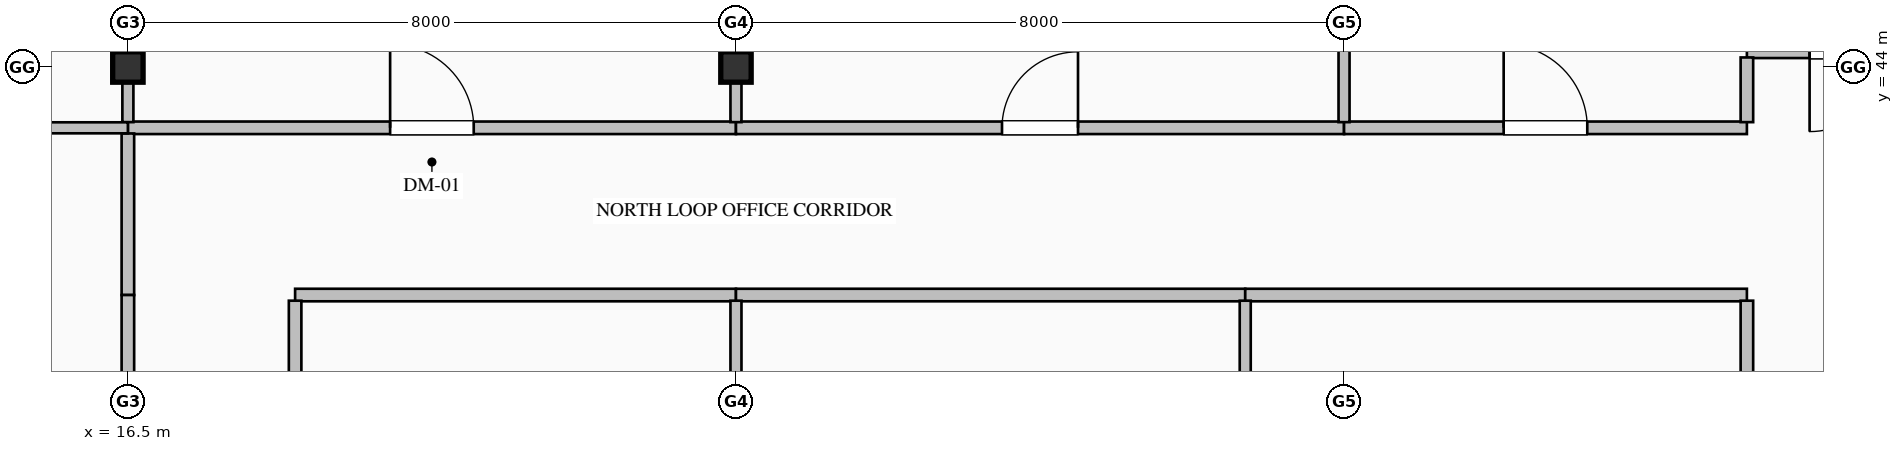
"""IFC4 building model, lengths in metres.
Left out: names, types, materials, properties, quantities, classifications, styles, units other than length and angle.
Written with IfcOpenShell. Run it as: python <this file> out.ifc"""

import sys

from ifc_helpers import new_model, si_unit, direction, frame, frame_2d, origin, origin_2d, place, context, subcontext, project, spatial, rectangle, i_section, extrude, element, fill, save


model = new_model("IFC4")
c1 = context("Model", 3, precision=1e-05, world=origin(), true_north=direction((0.0, 1.0)))
c2 = subcontext(c1, "Body", "Model", "MODEL_VIEW")
j1 = project(units=[si_unit("LENGTHUNIT", "METRE"), si_unit("PLANEANGLEUNIT", "RADIAN")], contexts=[c1])
p1 = place(None, origin())
s1 = spatial("IfcSite", under=j1, at=p1, CompositionType="ELEMENT")
p2 = place(p1, origin())
s2 = spatial("IfcBuilding", under=s1, at=p2, CompositionType="ELEMENT")
p3 = place(p2, frame((0.0, 0.0, 135.0)))
s3 = spatial("IfcBuildingStorey", under=s2, at=p3, CompositionType="ELEMENT", Elevation=135.0)
for number, where, z_axis, x_axis in (
    (1, (16.5, 44.0, 0.0), (0.0, 0.0, 1.0), (1.0, 0.0, 0.0)),
    (2, (24.5, 44.0, 0.0), (0.0, 0.0, 1.0), (1.0, 0.0, 0.0)),
):
    element("IfcColumn", number, at=place(p3, frame(where, z_axis=z_axis, x_axis=x_axis)), inside=s3, PredefinedType="COLUMN", context=c2, shape_type="SweptSolid", body=[
        extrude(i_section(OverallWidth=0.4, OverallDepth=0.4, WebThickness=0.013, FlangeThickness=0.021, FilletRadius=0.022, at=origin_2d()), origin(), (0.0, 0.0, 1.0), 4.0),
    ])
p4 = place(p3, frame((40.5, 44.2, 0.0), z_axis=(0.0, 0.0, 1.0), x_axis=(-1.0, 0.0, 0.0)))
e3 = element("IfcWall", 3, at=p4, inside=s3, PredefinedType="PARTITIONING", context=c2, shape_type="SweptSolid", body=[
    extrude(rectangle(XDim=2.7, YDim=0.165, at=frame_2d((1.35, 0.0))), origin(), (0.0, 0.0, 1.0), 3.765),
])
p5 = place(p4, frame((0.825, 0.0, 0.0)))
e4 = element("IfcOpeningElement", 4, at=p5, cuts=e3, PredefinedType="OPENING", context=c2, shape_type="SweptSolid", body=[
    extrude(rectangle(XDim=1.05, YDim=2.15, at=frame_2d((0.525, 1.075))), frame((0.0, 0.093, 0.0), z_axis=(0.0, -1.0, 0.0), x_axis=(1.0, 0.0, 0.0)), (0.0, 0.0, 1.0), 0.185),
])
p6 = place(p3, frame((16.5, 43.2, 0.0), z_axis=(0.0, 0.0, 1.0), x_axis=(1.0, 0.0, 0.0)))
e5 = element("IfcWall", 5, at=p6, inside=s3, PredefinedType="PARTITIONING", context=c2, shape_type="SweptSolid", body=[
    extrude(rectangle(XDim=8.0, YDim=0.165, at=frame_2d((4.0, 0.0))), origin(), (0.0, 0.0, 1.0), 3.765),
])
p7 = place(p6, frame((3.45, 0.0, 0.0)))
e6 = element("IfcOpeningElement", 6, at=p7, cuts=e5, PredefinedType="OPENING", context=c2, shape_type="SweptSolid", body=[
    extrude(rectangle(XDim=1.1, YDim=2.2, at=frame_2d((0.55, 1.1))), frame((0.0, 0.093, 0.0), z_axis=(0.0, -1.0, 0.0), x_axis=(1.0, 0.0, 0.0)), (0.0, 0.0, 1.0), 0.185),
])
p8 = place(p3, frame((24.5, 43.2, 0.0), z_axis=(0.0, 0.0, 1.0), x_axis=(1.0, 0.0, 0.0)))
e7 = element("IfcWall", 7, at=p8, inside=s3, PredefinedType="PARTITIONING", context=c2, shape_type="SweptSolid", body=[
    extrude(rectangle(XDim=8.0, YDim=0.165, at=frame_2d((4.0, 0.0))), origin(), (0.0, 0.0, 1.0), 3.765),
])
p9 = place(p8, frame((3.5, 0.0, 0.0)))
e8 = element("IfcOpeningElement", 8, at=p9, cuts=e7, PredefinedType="OPENING", context=c2, shape_type="SweptSolid", body=[
    extrude(rectangle(XDim=1.0, YDim=2.15, at=frame_2d((0.5, 1.075))), frame((0.0, 0.093, 0.0), z_axis=(0.0, -1.0, 0.0), x_axis=(1.0, 0.0, 0.0)), (0.0, 0.0, 1.0), 0.185),
])
p10 = place(p3, frame((32.5, 43.2, 0.0), z_axis=(0.0, 0.0, 1.0), x_axis=(1.0, 0.0, 0.0)))
e9 = element("IfcWall", 9, at=p10, inside=s3, PredefinedType="PARTITIONING", context=c2, shape_type="SweptSolid", body=[
    extrude(rectangle(XDim=5.3, YDim=0.165, at=frame_2d((2.65, 0.0))), origin(), (0.0, 0.0, 1.0), 3.765),
])
p11 = place(p10, frame((2.1, 0.0, 0.0)))
e10 = element("IfcOpeningElement", 10, at=p11, cuts=e9, PredefinedType="OPENING", context=c2, shape_type="SweptSolid", body=[
    extrude(rectangle(XDim=1.1, YDim=2.2, at=frame_2d((0.55, 1.1))), frame((0.0, 0.093, 0.0), z_axis=(0.0, -1.0, 0.0), x_axis=(1.0, 0.0, 0.0)), (0.0, 0.0, 1.0), 0.185),
])
p12 = place(p3, frame((24.5, 41.0, 0.0), z_axis=(0.0, 0.0, 1.0), x_axis=(-1.0, 0.0, 0.0)))
e11 = element("IfcWall", 11, at=p12, inside=s3, PredefinedType="PARTITIONING", context=c2, shape_type="SweptSolid", body=[
    extrude(rectangle(XDim=5.8, YDim=0.165, at=frame_2d((2.9, 0.0))), origin(), (0.0, 0.0, 1.0), 3.765),
])
p13 = place(p3, frame((31.2, 41.0, 0.0), z_axis=(0.0, 0.0, 1.0), x_axis=(-1.0, 0.0, 0.0)))
e12 = element("IfcWall", 12, at=p13, inside=s3, PredefinedType="PARTITIONING", context=c2, shape_type="SweptSolid", body=[
    extrude(rectangle(XDim=6.7, YDim=0.165, at=frame_2d((3.35, 0.0))), origin(), (0.0, 0.0, 1.0), 3.765),
])
p14 = place(p3, frame((37.8, 41.0, 0.0), z_axis=(0.0, 0.0, 1.0), x_axis=(-1.0, 0.0, 0.0)))
e13 = element("IfcWall", 13, at=p14, inside=s3, PredefinedType="PARTITIONING", context=c2, shape_type="SweptSolid", body=[
    extrude(rectangle(XDim=6.6, YDim=0.165, at=frame_2d((3.3, 0.0))), origin(), (0.0, 0.0, 1.0), 3.765),
])
p15 = place(p3, frame((16.5, 41.0, 0.0), z_axis=(0.0, 0.0, 1.0), x_axis=(0.0, 1.0, 0.0)))
e14 = element("IfcWall", 14, at=p15, inside=s3, PredefinedType="PARTITIONING", context=c2, shape_type="SweptSolid", body=[
    extrude(rectangle(XDim=2.125, YDim=0.165, at=frame_2d((1.063, 0.0))), origin(), (0.0, 0.0, 1.0), 3.157),
])
p16 = place(p3, frame((18.7, 40.926, 0.0), z_axis=(0.0, 0.0, 1.0), x_axis=(0.0, -1.0, 0.0)))
e15 = element("IfcWall", 15, at=p16, inside=s3, PredefinedType="PARTITIONING", context=c2, shape_type="SweptSolid", body=[
    extrude(rectangle(XDim=7.451, YDim=0.165, at=frame_2d((3.726, 0.0))), origin(), (0.0, 0.0, 1.0), 3.765),
])
p17 = place(p16, frame((3.176, 0.0, 0.0)))
e16 = element("IfcOpeningElement", 16, at=p17, cuts=e15, PredefinedType="OPENING", context=c2, shape_type="SweptSolid", body=[
    extrude(rectangle(XDim=1.1, YDim=2.2, at=frame_2d((0.55, 1.1))), frame((0.0, 0.093, 0.0), z_axis=(0.0, -1.0, 0.0), x_axis=(1.0, 0.0, 0.0)), (0.0, 0.0, 1.0), 0.185),
])
p18 = place(p3, frame((16.5, 33.4, 0.0), z_axis=(0.0, 0.0, 1.0), x_axis=(0.0, 1.0, 0.0)))
e17 = element("IfcWall", 17, at=p18, inside=s3, PredefinedType="PARTITIONING", context=c2, shape_type="SweptSolid", body=[
    extrude(rectangle(XDim=7.6, YDim=0.165, at=frame_2d((3.8, 0.0))), origin(), (0.0, 0.0, 1.0), 3.157),
])
p19 = place(p18, frame((3.3, 0.0, 0.0)))
e18 = element("IfcOpeningElement", 18, at=p19, cuts=e17, PredefinedType="OPENING", context=c2, shape_type="SweptSolid", body=[
    extrude(rectangle(XDim=1.0, YDim=2.15, at=frame_2d((0.5, 1.075))), frame((0.0, 0.093, 0.0), z_axis=(0.0, -1.0, 0.0), x_axis=(1.0, 0.0, 0.0)), (0.0, 0.0, 1.0), 0.185),
])
p20 = place(p3, frame((37.8, 43.274, 0.0), z_axis=(0.0, 0.0, 1.0), x_axis=(0.0, 1.0, 0.0)))
e19 = element("IfcWall", 19, at=p20, inside=s3, PredefinedType="PARTITIONING", context=c2, shape_type="SweptSolid", body=[
    extrude(rectangle(XDim=0.851, YDim=0.165, at=frame_2d((0.426, 0.0))), origin(), (0.0, 0.0, 1.0), 3.765),
])
p21 = place(p3, frame((37.8, 33.475, 0.0), z_axis=(0.0, 0.0, 1.0), x_axis=(0.0, 1.0, 0.0)))
e20 = element("IfcWall", 20, at=p21, inside=s3, PredefinedType="PARTITIONING", context=c2, shape_type="SweptSolid", body=[
    extrude(rectangle(XDim=7.451, YDim=0.165, at=frame_2d((3.726, 0.0))), origin(), (0.0, 0.0, 1.0), 3.765),
])
p22 = place(p21, frame((3.176, 0.0, 0.0)))
e21 = element("IfcOpeningElement", 21, at=p22, cuts=e20, PredefinedType="OPENING", context=c2, shape_type="SweptSolid", body=[
    extrude(rectangle(XDim=1.1, YDim=2.2, at=frame_2d((0.55, 1.1))), frame((0.0, 0.093, 0.0), z_axis=(0.0, -1.0, 0.0), x_axis=(1.0, 0.0, 0.0)), (0.0, 0.0, 1.0), 0.185),
])
p23 = place(p3, frame((16.5, 51.668, 0.0), z_axis=(0.0, 0.0, 1.0), x_axis=(0.0, -1.0, 0.0)))
e22 = element("IfcWall", 22, at=p23, inside=s3, PredefinedType="PARTITIONING", context=c2, shape_type="SweptSolid", body=[
    extrude(rectangle(XDim=8.394, YDim=0.145, at=frame_2d((4.197, 0.0))), origin(), (0.0, 0.0, 1.0), 3.157),
])
p24 = place(p23, frame((3.647, 0.0, 0.0)))
e23 = element("IfcOpeningElement", 23, at=p24, cuts=e22, PredefinedType="OPENING", context=c2, shape_type="SweptSolid", body=[
    extrude(rectangle(XDim=1.1, YDim=2.2, at=frame_2d((0.55, 1.1))), frame((0.0, 0.083, 0.0), z_axis=(0.0, -1.0, 0.0), x_axis=(1.0, 0.0, 0.0)), (0.0, 0.0, 1.0), 0.165),
])
p25 = place(p3, frame((16.5, 43.2, 0.0), z_axis=(0.0, 0.0, 1.0), x_axis=(-1.0, 0.0, 0.0)))
e24 = element("IfcWall", 24, at=p25, inside=s3, PredefinedType="PARTITIONING", context=c2, shape_type="SweptSolid", body=[
    extrude(rectangle(XDim=7.168, YDim=0.145, at=frame_2d((3.584, 0.0))), origin(), (0.0, 0.0, 1.0), 3.765),
])
p26 = place(p3, frame((24.5, 51.668, 0.0), z_axis=(0.0, 0.0, 1.0), x_axis=(0.0, -1.0, 0.0)))
e25 = element("IfcWall", 25, at=p26, inside=s3, PredefinedType="PARTITIONING", context=c2, shape_type="SweptSolid", body=[
    extrude(rectangle(XDim=8.394, YDim=0.145, at=frame_2d((4.197, 0.0))), origin(), (0.0, 0.0, 1.0), 3.157),
])
p27 = place(p3, frame((32.5, 51.668, 0.0), z_axis=(0.0, 0.0, 1.0), x_axis=(0.0, -1.0, 0.0)))
e26 = element("IfcWall", 26, at=p27, inside=s3, PredefinedType="PARTITIONING", context=c2, shape_type="SweptSolid", body=[
    extrude(rectangle(XDim=8.394, YDim=0.145, at=frame_2d((4.197, 0.0))), origin(), (0.0, 0.0, 1.0), 3.765),
])
p28 = place(p3, frame((24.5, 40.926, 0.0), z_axis=(0.0, 0.0, 1.0), x_axis=(0.0, -1.0, 0.0)))
e27 = element("IfcWall", 27, at=p28, inside=s3, PredefinedType="PARTITIONING", context=c2, shape_type="SweptSolid", body=[
    extrude(rectangle(XDim=7.451, YDim=0.145, at=frame_2d((3.726, 0.0))), origin(), (0.0, 0.0, 1.0), 3.157),
])
p29 = place(p3, frame((31.2, 40.926, 0.0), z_axis=(0.0, 0.0, 1.0), x_axis=(0.0, -1.0, 0.0)))
e28 = element("IfcWall", 28, at=p29, inside=s3, PredefinedType="PARTITIONING", context=c2, shape_type="SweptSolid", body=[
    extrude(rectangle(XDim=7.451, YDim=0.145, at=frame_2d((3.726, 0.0))), origin(), (0.0, 0.0, 1.0), 3.765),
])
p30 = place(p5, origin())
e29 = element("IfcDoor", 29, at=p30, inside=s3, OperationType="SINGLE_SWING_RIGHT", PredefinedType="DOOR", context=c2, shape_type="SweptSolid", body=[
    extrude(rectangle(XDim=1.05, YDim=2.15, at=frame_2d((0.525, 1.075))), frame((0.0, 0.025, 0.0), z_axis=(0.0, -1.0, 0.0), x_axis=(1.0, 0.0, 0.0)), (0.0, 0.0, 1.0), 0.05),
])
fill(e4, e29)
p31 = place(p7, origin())
e30 = element("IfcDoor", 30, at=p31, inside=s3, OperationType="SINGLE_SWING_LEFT", PredefinedType="DOOR", context=c2, shape_type="SweptSolid", body=[
    extrude(rectangle(XDim=1.1, YDim=2.2, at=frame_2d((0.55, 1.1))), frame((0.0, 0.025, 0.0), z_axis=(0.0, -1.0, 0.0), x_axis=(1.0, 0.0, 0.0)), (0.0, 0.0, 1.0), 0.05),
])
fill(e6, e30)
p32 = place(p9, origin())
e31 = element("IfcDoor", 31, at=p32, inside=s3, OperationType="SINGLE_SWING_RIGHT", PredefinedType="DOOR", context=c2, shape_type="SweptSolid", body=[
    extrude(rectangle(XDim=1.0, YDim=2.15, at=frame_2d((0.5, 1.075))), frame((0.0, 0.025, 0.0), z_axis=(0.0, -1.0, 0.0), x_axis=(1.0, 0.0, 0.0)), (0.0, 0.0, 1.0), 0.05),
])
fill(e8, e31)
p33 = place(p11, origin())
e32 = element("IfcDoor", 32, at=p33, inside=s3, OperationType="SINGLE_SWING_LEFT", PredefinedType="DOOR", context=c2, shape_type="SweptSolid", body=[
    extrude(rectangle(XDim=1.1, YDim=2.2, at=frame_2d((0.55, 1.1))), frame((0.0, 0.025, 0.0), z_axis=(0.0, -1.0, 0.0), x_axis=(1.0, 0.0, 0.0)), (0.0, 0.0, 1.0), 0.05),
])
fill(e10, e32)
save(model, sys.argv[1])
